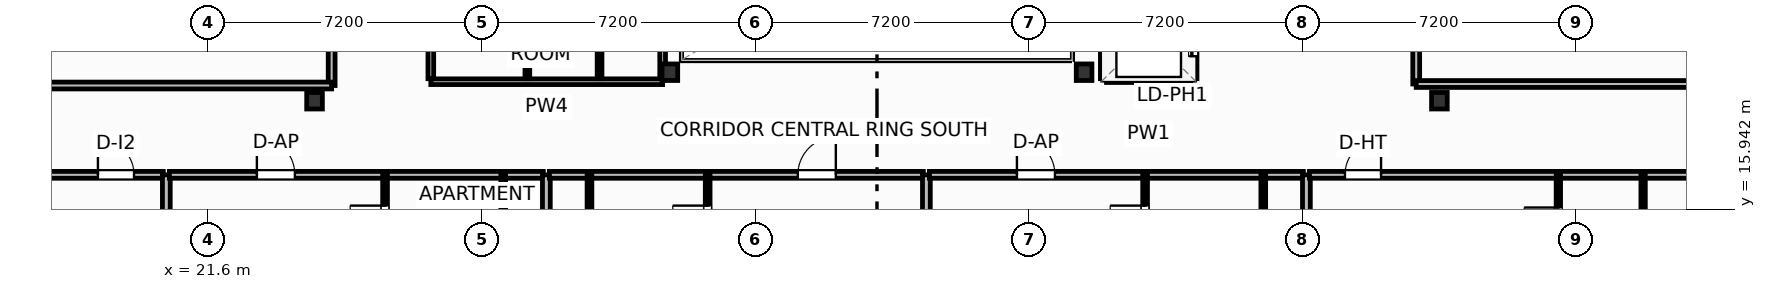
"""IFC4 building model, lengths in metres.
Left out: names, types, materials, properties, quantities, classifications, styles, units other than length and angle.
Written with IfcOpenShell. Run it as: python <this file> out.ifc"""

import sys

from ifc_helpers import new_model, si_unit, direction, frame, frame_2d, origin, origin_2d, place, context, subcontext, project, spatial, rectangle, i_section, extrude, element, fill, save


model = new_model("IFC4")
c1 = context("Model", 3, precision=1e-05, world=origin(), true_north=direction((0.0, 1.0)))
c2 = subcontext(c1, "Body", "Model", "MODEL_VIEW")
j1 = project(units=[si_unit("LENGTHUNIT", "METRE"), si_unit("PLANEANGLEUNIT", "RADIAN")], contexts=[c1])
p1 = place(None, origin())
s1 = spatial("IfcSite", under=j1, at=p1, CompositionType="ELEMENT")
p2 = place(p1, origin())
s2 = spatial("IfcBuilding", under=s1, at=p2, CompositionType="ELEMENT")
p3 = place(p2, frame((0.0, 0.0, 220.1)))
s3 = spatial("IfcBuildingStorey", under=s2, at=p3, CompositionType="ELEMENT", Elevation=220.1)
for number, where, z_axis, x_axis in (
    (1, (33.75, 19.55, 0.0), (0.0, 0.0, 1.0), (1.0, 0.0, 0.0)),
    (2, (44.65, 19.55, 0.0), (0.0, 0.0, 1.0), (1.0, 0.0, 0.0)),
    (3, (24.4, 18.8, 0.0), (0.0, 0.0, 1.0), (1.0, 0.0, 0.0)),
    (4, (54.0, 18.8, 0.0), (0.0, 0.0, 1.0), (1.0, 0.0, 0.0)),
):
    element("IfcColumn", number, at=place(p3, frame(where, z_axis=z_axis, x_axis=x_axis)), inside=s3, PredefinedType="COLUMN", context=c2, shape_type="SweptSolid", body=[
        extrude(i_section(OverallWidth=0.412, OverallDepth=0.435, WebThickness=0.036, FlangeThickness=0.057, FilletRadius=0.025, at=origin_2d()), origin(), (0.0, 0.0, 1.0), 3.7),
    ])
p4 = place(p3, frame((56.219, 9.845, 0.0), z_axis=(0.0, 0.0, 1.0), x_axis=(0.935225601791, 0.354052360188, 0.0)))
e5 = element("IfcWall", 5, at=p4, inside=s3, PredefinedType="SOLIDWALL", context=c2, shape_type="SweptSolid", body=[
    extrude(rectangle(XDim=17.647, YDim=0.22, at=frame_2d((8.824, 0.0))), origin(), (0.0, 0.0, 1.0), 2.73),
])
p5 = place(p4, frame((7.774, 0.0, 0.8)))
e6 = element("IfcOpeningElement", 6, at=p5, cuts=e5, PredefinedType="OPENING", context=c2, shape_type="SweptSolid", body=[
    extrude(rectangle(XDim=2.1, YDim=1.75, at=frame_2d((1.05, 0.875))), frame((0.0, 0.12, 0.0), z_axis=(0.0, -1.0, 0.0), x_axis=(1.0, 0.0, 0.0)), (0.0, 0.0, 1.0), 0.24),
])
p6 = place(p3, frame((7.196, 16.85, 0.0), z_axis=(0.0, 0.0, 1.0), x_axis=(1.0, 0.0, 0.0)))
e7 = element("IfcWall", 7, at=p6, inside=s3, PredefinedType="PARTITIONING", context=c2, shape_type="SweptSolid", body=[
    extrude(rectangle(XDim=13.224, YDim=0.18, at=frame_2d((6.612, 0.0))), origin(), (0.0, 0.0, 1.0), 3.45),
])
p7 = place(p6, frame((11.504, 0.0, 0.0)))
e8 = element("IfcOpeningElement", 8, at=p7, cuts=e7, PredefinedType="OPENING", context=c2, shape_type="SweptSolid", body=[
    extrude(rectangle(XDim=0.95, YDim=2.05, at=frame_2d((0.475, 1.025))), frame((0.0, 0.1, 0.0), z_axis=(0.0, -1.0, 0.0), x_axis=(1.0, 0.0, 0.0)), (0.0, 0.0, 1.0), 0.2),
])
p8 = place(p3, frame((20.5, -3.657, 0.0), z_axis=(0.0, 0.0, 1.0), x_axis=(0.0, 1.0, 0.0)))
e9 = element("IfcWall", 9, at=p8, inside=s3, PredefinedType="PARTITIONING", context=c2, shape_type="SweptSolid", body=[
    extrude(rectangle(XDim=20.507, YDim=0.205, at=frame_2d((10.253, 0.0))), origin(), (0.0, 0.0, 1.0), 3.45),
])
p9 = place(p3, frame((20.58, 16.85, 0.0), z_axis=(0.0, 0.0, 1.0), x_axis=(1.0, 0.0, 0.0)))
e10 = element("IfcWall", 10, at=p9, inside=s3, PredefinedType="PARTITIONING", context=c2, shape_type="SweptSolid", body=[
    extrude(rectangle(XDim=9.84, YDim=0.18, at=frame_2d((4.92, 0.0))), origin(), (0.0, 0.0, 1.0), 3.45),
])
p10 = place(p9, frame((2.302, 0.0, 0.0)))
e11 = element("IfcOpeningElement", 11, at=p10, cuts=e10, PredefinedType="OPENING", context=c2, shape_type="SweptSolid", body=[
    extrude(rectangle(XDim=1.0, YDim=2.2, at=frame_2d((0.5, 1.1))), frame((0.0, 0.1, 0.0), z_axis=(0.0, -1.0, 0.0), x_axis=(1.0, 0.0, 0.0)), (0.0, 0.0, 1.0), 0.2),
])
p11 = place(p3, frame((26.255, -1.478, 0.0), z_axis=(0.0, 0.0, 1.0), x_axis=(0.0, 1.0, 0.0)))
e12 = element("IfcWall", 12, at=p11, inside=s3, PredefinedType="PARTITIONING", context=c2, shape_type="SweptSolid", body=[
    extrude(rectangle(XDim=18.328, YDim=0.125, at=frame_2d((9.164, 0.0))), origin(), (0.0, 0.0, 1.0), 2.739),
])
p12 = place(p11, frame((6.319, 0.0, 0.0)))
e13 = element("IfcOpeningElement", 13, at=p12, cuts=e12, PredefinedType="OPENING", context=c2, shape_type="SweptSolid", body=[
    extrude(rectangle(XDim=0.92, YDim=2.05, at=frame_2d((0.46, 1.025))), frame((0.0, 0.073, 0.0), z_axis=(0.0, -1.0, 0.0), x_axis=(1.0, 0.0, 0.0)), (0.0, 0.0, 1.0), 0.145),
])
p13 = place(p11, frame((14.305, 0.0, 0.0)))
e14 = element("IfcOpeningElement", 14, at=p13, cuts=e12, PredefinedType="OPENING", context=c2, shape_type="SweptSolid", body=[
    extrude(rectangle(XDim=0.9, YDim=2.05, at=frame_2d((0.45, 1.025))), frame((0.0, 0.073, 0.0), z_axis=(0.0, -1.0, 0.0), x_axis=(1.0, 0.0, 0.0)), (0.0, 0.0, 1.0), 0.145),
])
p14 = place(p11, frame((16.598, 0.0, 0.0)))
e15 = element("IfcOpeningElement", 15, at=p14, cuts=e12, PredefinedType="OPENING", context=c2, shape_type="SweptSolid", body=[
    extrude(rectangle(XDim=0.92, YDim=2.05, at=frame_2d((0.46, 1.025))), frame((0.0, 0.073, 0.0), z_axis=(0.0, -1.0, 0.0), x_axis=(1.0, 0.0, 0.0)), (0.0, 0.0, 1.0), 0.145),
])
p15 = place(p3, frame((29.365, 14.44, 0.0), z_axis=(0.0, 0.0, 1.0), x_axis=(0.0, 1.0, 0.0)))
e16 = element("IfcWall", 16, at=p15, inside=s3, PredefinedType="PARTITIONING", context=c2, shape_type="SweptSolid", body=[
    extrude(rectangle(XDim=2.41, YDim=0.125, at=frame_2d((1.205, 0.0))), origin(), (0.0, 0.0, 1.0), 3.45),
])
p16 = place(p3, frame((30.5, 0.129, 0.0), z_axis=(0.0, 0.0, 1.0), x_axis=(0.0, 1.0, 0.0)))
e17 = element("IfcWall", 17, at=p16, inside=s3, PredefinedType="PARTITIONING", context=c2, shape_type="SweptSolid", body=[
    extrude(rectangle(XDim=16.721, YDim=0.205, at=frame_2d((8.36, 0.0))), origin(), (0.0, 0.0, 1.0), 3.45),
])
p17 = place(p3, frame((30.58, 16.85, 0.0), z_axis=(0.0, 0.0, 1.0), x_axis=(1.0, 0.0, 0.0)))
e18 = element("IfcWall", 18, at=p17, inside=s3, PredefinedType="PARTITIONING", context=c2, shape_type="SweptSolid", body=[
    extrude(rectangle(XDim=9.84, YDim=0.18, at=frame_2d((4.92, 0.0))), origin(), (0.0, 0.0, 1.0), 3.45),
])
p18 = place(p17, frame((6.537, 0.0, 0.0)))
e19 = element("IfcOpeningElement", 19, at=p18, cuts=e18, PredefinedType="OPENING", context=c2, shape_type="SweptSolid", body=[
    extrude(rectangle(XDim=1.0, YDim=2.2, at=frame_2d((0.5, 1.1))), frame((0.0, 0.1, 0.0), z_axis=(0.0, -1.0, 0.0), x_axis=(1.0, 0.0, 0.0)), (0.0, 0.0, 1.0), 0.2),
])
p19 = place(p3, frame((34.745, 1.736, 0.0), z_axis=(0.0, 0.0, 1.0), x_axis=(0.0, 1.0, 0.0)))
e20 = element("IfcWall", 20, at=p19, inside=s3, PredefinedType="PARTITIONING", context=c2, shape_type="SweptSolid", body=[
    extrude(rectangle(XDim=15.114, YDim=0.125, at=frame_2d((7.557, 0.0))), origin(), (0.0, 0.0, 1.0), 2.739),
])
p20 = place(p19, frame((4.712, 0.0, 0.0)))
e21 = element("IfcOpeningElement", 21, at=p20, cuts=e20, PredefinedType="OPENING", context=c2, shape_type="SweptSolid", body=[
    extrude(rectangle(XDim=0.92, YDim=2.05, at=frame_2d((0.46, 1.025))), frame((0.0, 0.073, 0.0), z_axis=(0.0, -1.0, 0.0), x_axis=(1.0, 0.0, 0.0)), (0.0, 0.0, 1.0), 0.145),
])
p21 = place(p19, frame((11.091, 0.0, 0.0)))
e22 = element("IfcOpeningElement", 22, at=p21, cuts=e20, PredefinedType="OPENING", context=c2, shape_type="SweptSolid", body=[
    extrude(rectangle(XDim=0.9, YDim=2.05, at=frame_2d((0.45, 1.025))), frame((0.0, 0.073, 0.0), z_axis=(0.0, -1.0, 0.0), x_axis=(1.0, 0.0, 0.0)), (0.0, 0.0, 1.0), 0.145),
])
p22 = place(p19, frame((13.384, 0.0, 0.0)))
e23 = element("IfcOpeningElement", 23, at=p22, cuts=e20, PredefinedType="OPENING", context=c2, shape_type="SweptSolid", body=[
    extrude(rectangle(XDim=0.92, YDim=2.05, at=frame_2d((0.46, 1.025))), frame((0.0, 0.073, 0.0), z_axis=(0.0, -1.0, 0.0), x_axis=(1.0, 0.0, 0.0)), (0.0, 0.0, 1.0), 0.145),
])
p23 = place(p3, frame((31.635, 14.44, 0.0), z_axis=(0.0, 0.0, 1.0), x_axis=(0.0, 1.0, 0.0)))
e24 = element("IfcWall", 24, at=p23, inside=s3, PredefinedType="PARTITIONING", context=c2, shape_type="SweptSolid", body=[
    extrude(rectangle(XDim=2.41, YDim=0.125, at=frame_2d((1.205, 0.0))), origin(), (0.0, 0.0, 1.0), 3.45),
])
p24 = place(p3, frame((40.5, 6.16, 0.0), z_axis=(0.0, 0.0, 1.0), x_axis=(0.0, 1.0, 0.0)))
e25 = element("IfcWall", 25, at=p24, inside=s3, PredefinedType="PARTITIONING", context=c2, shape_type="SweptSolid", body=[
    extrude(rectangle(XDim=10.69, YDim=0.205, at=frame_2d((5.345, 0.0))), origin(), (0.0, 0.0, 1.0), 3.45),
])
p25 = place(p3, frame((40.58, 16.85, 0.0), z_axis=(0.0, 0.0, 1.0), x_axis=(1.0, 0.0, 0.0)))
e26 = element("IfcWall", 26, at=p25, inside=s3, PredefinedType="PARTITIONING", context=c2, shape_type="SweptSolid", body=[
    extrude(rectangle(XDim=9.84, YDim=0.18, at=frame_2d((4.92, 0.0))), origin(), (0.0, 0.0, 1.0), 3.45),
])
p26 = place(p25, frame((2.302, 0.0, 0.0)))
e27 = element("IfcOpeningElement", 27, at=p26, cuts=e26, PredefinedType="OPENING", context=c2, shape_type="SweptSolid", body=[
    extrude(rectangle(XDim=1.0, YDim=2.2, at=frame_2d((0.5, 1.1))), frame((0.0, 0.1, 0.0), z_axis=(0.0, -1.0, 0.0), x_axis=(1.0, 0.0, 0.0)), (0.0, 0.0, 1.0), 0.2),
])
p27 = place(p3, frame((46.255, 6.094, 0.0), z_axis=(0.0, 0.0, 1.0), x_axis=(0.0, 1.0, 0.0)))
e28 = element("IfcWall", 28, at=p27, inside=s3, PredefinedType="PARTITIONING", context=c2, shape_type="SweptSolid", body=[
    extrude(rectangle(XDim=10.756, YDim=0.125, at=frame_2d((5.378, 0.0))), origin(), (0.0, 0.0, 1.0), 3.45),
])
p28 = place(p27, frame((3.003, 0.0, 0.0)))
e29 = element("IfcOpeningElement", 29, at=p28, cuts=e28, PredefinedType="OPENING", context=c2, shape_type="SweptSolid", body=[
    extrude(rectangle(XDim=0.92, YDim=2.05, at=frame_2d((0.46, 1.025))), frame((0.0, 0.073, 0.0), z_axis=(0.0, -1.0, 0.0), x_axis=(1.0, 0.0, 0.0)), (0.0, 0.0, 1.0), 0.145),
])
p29 = place(p27, frame((6.733, 0.0, 0.0)))
e30 = element("IfcOpeningElement", 30, at=p29, cuts=e28, PredefinedType="OPENING", context=c2, shape_type="SweptSolid", body=[
    extrude(rectangle(XDim=0.9, YDim=2.05, at=frame_2d((0.45, 1.025))), frame((0.0, 0.073, 0.0), z_axis=(0.0, -1.0, 0.0), x_axis=(1.0, 0.0, 0.0)), (0.0, 0.0, 1.0), 0.145),
])
p30 = place(p27, frame((9.026, 0.0, 0.0)))
e31 = element("IfcOpeningElement", 31, at=p30, cuts=e28, PredefinedType="OPENING", context=c2, shape_type="SweptSolid", body=[
    extrude(rectangle(XDim=0.92, YDim=2.05, at=frame_2d((0.46, 1.025))), frame((0.0, 0.073, 0.0), z_axis=(0.0, -1.0, 0.0), x_axis=(1.0, 0.0, 0.0)), (0.0, 0.0, 1.0), 0.145),
])
p31 = place(p3, frame((49.365, 14.44, 0.0), z_axis=(0.0, 0.0, 1.0), x_axis=(0.0, 1.0, 0.0)))
e32 = element("IfcWall", 32, at=p31, inside=s3, PredefinedType="PARTITIONING", context=c2, shape_type="SweptSolid", body=[
    extrude(rectangle(XDim=2.41, YDim=0.125, at=frame_2d((1.205, 0.0))), origin(), (0.0, 0.0, 1.0), 3.45),
])
p32 = place(p3, frame((50.5, 9.946, 0.0), z_axis=(0.0, 0.0, 1.0), x_axis=(0.0, 1.0, 0.0)))
e33 = element("IfcWall", 33, at=p32, inside=s3, PredefinedType="PARTITIONING", context=c2, shape_type="SweptSolid", body=[
    extrude(rectangle(XDim=6.904, YDim=0.205, at=frame_2d((3.452, 0.0))), origin(), (0.0, 0.0, 1.0), 3.45),
])
p33 = place(p3, frame((50.58, 16.85, 0.0), z_axis=(0.0, 0.0, 1.0), x_axis=(1.0, 0.0, 0.0)))
e34 = element("IfcWall", 34, at=p33, inside=s3, PredefinedType="PARTITIONING", context=c2, shape_type="SweptSolid", body=[
    extrude(rectangle(XDim=23.404, YDim=0.18, at=frame_2d((11.702, 0.0))), origin(), (0.0, 0.0, 1.0), 3.45),
])
p34 = place(p33, frame((0.935, 0.0, 0.0)))
e35 = element("IfcOpeningElement", 35, at=p34, cuts=e34, PredefinedType="OPENING", context=c2, shape_type="SweptSolid", body=[
    extrude(rectangle(XDim=0.95, YDim=2.15, at=frame_2d((0.475, 1.075))), frame((0.0, 0.1, 0.0), z_axis=(0.0, -1.0, 0.0), x_axis=(1.0, 0.0, 0.0)), (0.0, 0.0, 1.0), 0.2),
])
p35 = place(p3, frame((57.13, 14.33, 0.0), z_axis=(0.0, 0.0, 1.0), x_axis=(0.0, 1.0, 0.0)))
e36 = element("IfcWall", 36, at=p35, inside=s3, PredefinedType="PARTITIONING", context=c2, shape_type="SweptSolid", body=[
    extrude(rectangle(XDim=2.52, YDim=0.115, at=frame_2d((1.26, 0.0))), origin(), (0.0, 0.0, 1.0), 3.45),
])
p36 = place(p35, frame((0.76, 0.0, 0.0)))
e37 = element("IfcOpeningElement", 37, at=p36, cuts=e36, PredefinedType="OPENING", context=c2, shape_type="SweptSolid", body=[
    extrude(rectangle(XDim=0.9, YDim=2.05, at=frame_2d((0.45, 1.025))), frame((0.0, 0.067, 0.0), z_axis=(0.0, -1.0, 0.0), x_axis=(1.0, 0.0, 0.0)), (0.0, 0.0, 1.0), 0.135),
])
p37 = place(p3, frame((59.36, 14.33, 0.0), z_axis=(0.0, 0.0, 1.0), x_axis=(0.0, 1.0, 0.0)))
e38 = element("IfcWall", 38, at=p37, inside=s3, PredefinedType="PARTITIONING", context=c2, shape_type="SweptSolid", body=[
    extrude(rectangle(XDim=2.52, YDim=0.115, at=frame_2d((1.26, 0.0))), origin(), (0.0, 0.0, 1.0), 3.45),
])
p38 = place(p3, frame((24.85, 19.2, 0.0), z_axis=(0.0, 0.0, 1.0), x_axis=(0.0, 1.0, 0.0)))
e39 = element("IfcWall", 39, at=p38, inside=s3, PredefinedType="PARTITIONING", context=c2, shape_type="SweptSolid", body=[
    extrude(rectangle(XDim=7.5, YDim=0.18, at=frame_2d((3.75, 0.0))), origin(), (0.0, 0.0, 1.0), 3.45),
])
p39 = place(p38, frame((3.275, 0.0, 0.0)))
e40 = element("IfcOpeningElement", 40, at=p39, cuts=e39, PredefinedType="OPENING", context=c2, shape_type="SweptSolid", body=[
    extrude(rectangle(XDim=0.95, YDim=2.05, at=frame_2d((0.475, 1.025))), frame((0.0, 0.1, 0.0), z_axis=(0.0, -1.0, 0.0), x_axis=(1.0, 0.0, 0.0)), (0.0, 0.0, 1.0), 0.2),
])
p40 = place(p3, frame((6.306, 19.2, 0.0), z_axis=(0.0, 0.0, 1.0), x_axis=(1.0, 0.0, 0.0)))
e41 = element("IfcWall", 41, at=p40, inside=s3, PredefinedType="PARTITIONING", context=c2, shape_type="SweptSolid", body=[
    extrude(rectangle(XDim=18.544, YDim=0.18, at=frame_2d((9.272, 0.0))), origin(), (0.0, 0.0, 1.0), 3.45),
])
p41 = place(p3, frame((53.39, 19.24, 0.0), z_axis=(0.0, 0.0, 1.0), x_axis=(0.0, 1.0, 0.0)))
e42 = element("IfcWall", 42, at=p41, inside=s3, PredefinedType="PARTITIONING", context=c2, shape_type="SweptSolid", body=[
    extrude(rectangle(XDim=20.06, YDim=0.18, at=frame_2d((10.03, 0.0))), origin(), (0.0, 0.0, 1.0), 3.45),
])
p42 = place(p41, frame((7.7, 0.0, 0.0)))
e43 = element("IfcOpeningElement", 43, at=p42, cuts=e42, PredefinedType="OPENING", context=c2, shape_type="SweptSolid", body=[
    extrude(rectangle(XDim=0.95, YDim=2.05, at=frame_2d((0.475, 1.025))), frame((0.0, 0.1, 0.0), z_axis=(0.0, -1.0, 0.0), x_axis=(1.0, 0.0, 0.0)), (0.0, 0.0, 1.0), 0.2),
])
p43 = place(p3, frame((53.39, 19.24, 0.0), z_axis=(0.0, 0.0, 1.0), x_axis=(1.0, 0.0, 0.0)))
e44 = element("IfcWall", 44, at=p43, inside=s3, PredefinedType="PARTITIONING", context=c2, shape_type="SweptSolid", body=[
    extrude(rectangle(XDim=22.217, YDim=0.18, at=frame_2d((11.108, 0.0))), origin(), (0.0, 0.0, 1.0), 3.45),
])
p44 = place(p3, frame((27.46, 19.3, 0.0), z_axis=(0.0, 0.0, 1.0), x_axis=(1.0, 0.0, 0.0)))
e45 = element("IfcWall", 45, at=p44, inside=s3, PredefinedType="PARTITIONING", context=c2, shape_type="SweptSolid", body=[
    extrude(rectangle(XDim=6.1, YDim=0.15, at=frame_2d((3.05, 0.0))), origin(), (0.0, 0.0, 1.0), 2.662),
])
for number, where, z_axis, x_axis in (
    (46, (30.0, 19.38, 0.0), (0.0, 0.0, 1.0), (0.0, 1.0, 0.0)),
    (47, (31.9, 19.38, 0.0), (0.0, 0.0, 1.0), (0.0, 1.0, 0.0)),
):
    element("IfcWall", number, at=place(p3, frame(where, z_axis=z_axis, x_axis=x_axis)), inside=s3, PredefinedType="PARTITIONING", context=c2, shape_type="SweptSolid", body=[
        extrude(rectangle(XDim=3.82, YDim=0.125, at=frame_2d((1.91, 0.0))), origin(), (0.0, 0.0, 1.0), 3.45),
    ])
p45 = place(p3, frame((27.46, 19.38, 0.0), z_axis=(0.0, 0.0, 1.0), x_axis=(0.0, 1.0, 0.0)))
e48 = element("IfcWall", 48, at=p45, inside=s3, PredefinedType="PARTITIONING", context=c2, shape_type="SweptSolid", body=[
    extrude(rectangle(XDim=7.16, YDim=0.15, at=frame_2d((3.58, 0.0))), origin(), (0.0, 0.0, 1.0), 3.45),
])
p46 = place(p45, frame((1.1, 0.0, 0.0)))
e49 = element("IfcOpeningElement", 49, at=p46, cuts=e48, PredefinedType="OPENING", context=c2, shape_type="SweptSolid", body=[
    extrude(rectangle(XDim=0.9, YDim=2.05, at=frame_2d((0.45, 1.025))), frame((0.0, 0.085, 0.0), z_axis=(0.0, -1.0, 0.0), x_axis=(1.0, 0.0, 0.0)), (0.0, 0.0, 1.0), 0.17),
])
p47 = place(p3, frame((33.56, 19.38, 0.0), z_axis=(0.0, 0.0, 1.0), x_axis=(0.0, 1.0, 0.0)))
e50 = element("IfcWall", 50, at=p47, inside=s3, PredefinedType="PARTITIONING", context=c2, shape_type="SweptSolid", body=[
    extrude(rectangle(XDim=7.16, YDim=0.15, at=frame_2d((3.58, 0.0))), origin(), (0.0, 0.0, 1.0), 2.824),
])
p48 = place(p3, frame((45.24, 19.38, 0.0), z_axis=(0.0, 0.0, 1.0), x_axis=(1.0, 0.0, 0.0)))
e51 = element("IfcWall", 51, at=p48, inside=s3, PredefinedType="PARTITIONING", context=c2, shape_type="SweptSolid", body=[
    extrude(rectangle(XDim=2.22, YDim=0.2, at=frame_2d((1.11, 0.0))), origin(), (0.0, 0.0, 1.0), 2.662),
])
p49 = place(p3, frame((45.18, 19.38, 0.0), z_axis=(0.0, 0.0, 1.0), x_axis=(0.0, 1.0, 0.0)))
e52 = element("IfcWall", 52, at=p49, inside=s3, PredefinedType="PARTITIONING", context=c2, shape_type="SweptSolid", body=[
    extrude(rectangle(XDim=6.9, YDim=0.2, at=frame_2d((3.45, 0.0))), origin(), (0.0, 0.0, 1.0), 3.45),
])
p50 = place(p3, frame((47.52, 19.38, 0.0), z_axis=(0.0, 0.0, 1.0), x_axis=(0.0, 1.0, 0.0)))
e53 = element("IfcWall", 53, at=p50, inside=s3, PredefinedType="PARTITIONING", context=c2, shape_type="SweptSolid", body=[
    extrude(rectangle(XDim=6.9, YDim=0.2, at=frame_2d((3.45, 0.0))), origin(), (0.0, 0.0, 1.0), 3.45),
])
p51 = place(p50, frame((0.59, 0.0, 0.0)))
e54 = element("IfcOpeningElement", 54, at=p51, cuts=e53, PredefinedType="OPENING", context=c2, shape_type="SweptSolid", body=[
    extrude(rectangle(XDim=1.1, YDim=2.15, at=frame_2d((0.55, 1.075))), frame((0.0, 0.11, 0.0), z_axis=(0.0, -1.0, 0.0), x_axis=(1.0, 0.0, 0.0)), (0.0, 0.0, 1.0), 0.22),
])
p52 = place(p50, frame((2.89, 0.0, 0.0)))
e55 = element("IfcOpeningElement", 55, at=p52, cuts=e53, PredefinedType="OPENING", context=c2, shape_type="SweptSolid", body=[
    extrude(rectangle(XDim=1.1, YDim=2.15, at=frame_2d((0.55, 1.075))), frame((0.0, 0.11, 0.0), z_axis=(0.0, -1.0, 0.0), x_axis=(1.0, 0.0, 0.0)), (0.0, 0.0, 1.0), 0.22),
])
p53 = place(p50, frame((5.19, 0.0, 0.0)))
e56 = element("IfcOpeningElement", 56, at=p53, cuts=e53, PredefinedType="OPENING", context=c2, shape_type="SweptSolid", body=[
    extrude(rectangle(XDim=1.1, YDim=2.15, at=frame_2d((0.55, 1.075))), frame((0.0, 0.11, 0.0), z_axis=(0.0, -1.0, 0.0), x_axis=(1.0, 0.0, 0.0)), (0.0, 0.0, 1.0), 0.22),
])
p54 = place(p7, origin())
e57 = element("IfcDoor", 57, at=p54, inside=s3, OperationType="SINGLE_SWING_LEFT", PredefinedType="DOOR", context=c2, shape_type="SweptSolid", body=[
    extrude(rectangle(XDim=0.95, YDim=2.05, at=frame_2d((0.475, 1.025))), frame((0.0, 0.025, 0.0), z_axis=(0.0, -1.0, 0.0), x_axis=(1.0, 0.0, 0.0)), (0.0, 0.0, 1.0), 0.05),
])
fill(e8, e57)
p55 = place(p10, origin())
e58 = element("IfcDoor", 58, at=p55, inside=s3, OperationType="SINGLE_SWING_LEFT", PredefinedType="DOOR", context=c2, shape_type="SweptSolid", body=[
    extrude(rectangle(XDim=1.0, YDim=2.2, at=frame_2d((0.5, 1.1))), frame((0.0, 0.025, 0.0), z_axis=(0.0, -1.0, 0.0), x_axis=(1.0, 0.0, 0.0)), (0.0, 0.0, 1.0), 0.05),
])
fill(e11, e58)
p56 = place(p14, origin())
e59 = element("IfcDoor", 59, at=p56, inside=s3, OperationType="SINGLE_SWING_RIGHT", PredefinedType="DOOR", context=c2, shape_type="SweptSolid", body=[
    extrude(rectangle(XDim=0.92, YDim=2.05, at=frame_2d((0.46, 1.025))), frame((0.0, 0.025, 0.0), z_axis=(0.0, -1.0, 0.0), x_axis=(1.0, 0.0, 0.0)), (0.0, 0.0, 1.0), 0.05),
])
fill(e15, e59)
p57 = place(p18, origin())
e60 = element("IfcDoor", 60, at=p57, inside=s3, OperationType="SINGLE_SWING_RIGHT", PredefinedType="DOOR", context=c2, shape_type="SweptSolid", body=[
    extrude(rectangle(XDim=1.0, YDim=2.2, at=frame_2d((0.5, 1.1))), frame((0.0, 0.025, 0.0), z_axis=(0.0, -1.0, 0.0), x_axis=(1.0, 0.0, 0.0)), (0.0, 0.0, 1.0), 0.05),
])
fill(e19, e60)
p58 = place(p22, origin())
e61 = element("IfcDoor", 61, at=p58, inside=s3, OperationType="SINGLE_SWING_RIGHT", PredefinedType="DOOR", context=c2, shape_type="SweptSolid", body=[
    extrude(rectangle(XDim=0.92, YDim=2.05, at=frame_2d((0.46, 1.025))), frame((0.0, 0.025, 0.0), z_axis=(0.0, -1.0, 0.0), x_axis=(1.0, 0.0, 0.0)), (0.0, 0.0, 1.0), 0.05),
])
fill(e23, e61)
p59 = place(p26, origin())
e62 = element("IfcDoor", 62, at=p59, inside=s3, OperationType="SINGLE_SWING_LEFT", PredefinedType="DOOR", context=c2, shape_type="SweptSolid", body=[
    extrude(rectangle(XDim=1.0, YDim=2.2, at=frame_2d((0.5, 1.1))), frame((0.0, 0.025, 0.0), z_axis=(0.0, -1.0, 0.0), x_axis=(1.0, 0.0, 0.0)), (0.0, 0.0, 1.0), 0.05),
])
fill(e27, e62)
p60 = place(p30, origin())
e63 = element("IfcDoor", 63, at=p60, inside=s3, OperationType="SINGLE_SWING_RIGHT", PredefinedType="DOOR", context=c2, shape_type="SweptSolid", body=[
    extrude(rectangle(XDim=0.92, YDim=2.05, at=frame_2d((0.46, 1.025))), frame((0.0, 0.025, 0.0), z_axis=(0.0, -1.0, 0.0), x_axis=(1.0, 0.0, 0.0)), (0.0, 0.0, 1.0), 0.05),
])
fill(e31, e63)
p61 = place(p34, origin())
e64 = element("IfcDoor", 64, at=p61, inside=s3, OperationType="SINGLE_SWING_RIGHT", PredefinedType="DOOR", context=c2, shape_type="SweptSolid", body=[
    extrude(rectangle(XDim=0.95, YDim=2.15, at=frame_2d((0.475, 1.075))), frame((0.0, 0.025, 0.0), z_axis=(0.0, -1.0, 0.0), x_axis=(1.0, 0.0, 0.0)), (0.0, 0.0, 1.0), 0.05),
])
fill(e35, e64)
p62 = place(p36, origin())
e65 = element("IfcDoor", 65, at=p62, inside=s3, OperationType="SINGLE_SWING_RIGHT", PredefinedType="DOOR", context=c2, shape_type="SweptSolid", body=[
    extrude(rectangle(XDim=0.9, YDim=2.05, at=frame_2d((0.45, 1.025))), frame((0.0, 0.025, 0.0), z_axis=(0.0, -1.0, 0.0), x_axis=(1.0, 0.0, 0.0)), (0.0, 0.0, 1.0), 0.05),
])
fill(e37, e65)
p63 = place(p51, origin())
e66 = element("IfcDoor", 66, at=p63, inside=s3, OperationType="SLIDING_TO_LEFT", PredefinedType="DOOR", context=c2, shape_type="SweptSolid", body=[
    extrude(rectangle(XDim=1.1, YDim=2.15, at=frame_2d((0.55, 1.075))), frame((0.0, 0.025, 0.0), z_axis=(0.0, -1.0, 0.0), x_axis=(1.0, 0.0, 0.0)), (0.0, 0.0, 1.0), 0.05),
])
fill(e54, e66)
save(model, sys.argv[1])
